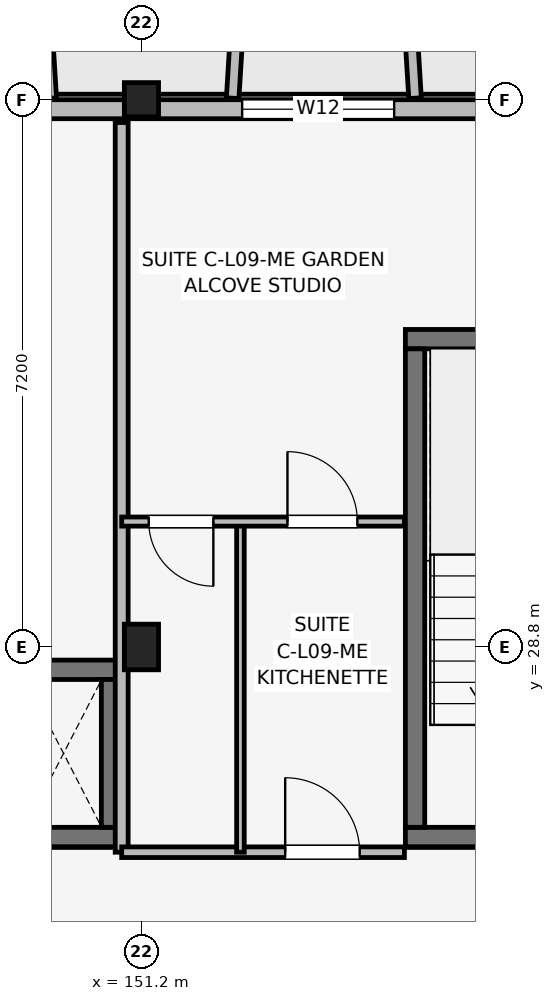
"""IFC4 building model, lengths in metres.
Left out: names, types, materials, properties, quantities, classifications, styles, units other than length and angle.
Written with IfcOpenShell. Run it as: python <this file> out.ifc"""

import sys

from ifc_helpers import new_model, si_unit, direction, frame, frame_2d, origin, origin_2d, place, context, subcontext, project, spatial, rectangle, extrude, element, fill, save


model = new_model("IFC4")
c1 = context("Model", 3, precision=1e-05, world=origin(), true_north=direction((0.0, 1.0)))
c2 = subcontext(c1, "Body", "Model", "MODEL_VIEW")
j1 = project(units=[si_unit("LENGTHUNIT", "METRE"), si_unit("PLANEANGLEUNIT", "RADIAN")], contexts=[c1])
p1 = place(None, origin())
s1 = spatial("IfcSite", under=j1, at=p1, CompositionType="ELEMENT")
p2 = place(p1, origin())
s2 = spatial("IfcBuilding", under=s1, at=p2, CompositionType="ELEMENT")
p3 = place(p2, frame((0.0, 0.0, 30.75)))
s3 = spatial("IfcBuildingStorey", under=s2, at=p3, CompositionType="ELEMENT", Elevation=30.75)
p4 = place(p3, frame((151.2, 28.8, 0.0), z_axis=(0.0, 0.0, 1.0), x_axis=(1.0, 0.0, 0.0)))
e1 = element("IfcColumn", 1, at=p4, inside=s3, PredefinedType="COLUMN", context=c2, shape_type="SweptSolid", body=[
    extrude(rectangle(XDim=0.45, YDim=0.6, at=origin_2d()), origin(), (0.0, 0.0, 1.0), 3.15),
])
p5 = place(p3, frame((151.2, 36.0, 0.0), z_axis=(0.0, 0.0, 1.0), x_axis=(1.0, 0.0, 0.0)))
e2 = element("IfcColumn", 2, at=p5, inside=s3, PredefinedType="COLUMN", context=c2, shape_type="SweptSolid", body=[
    extrude(rectangle(XDim=0.45, YDim=0.45, at=origin_2d()), origin(), (0.0, 0.0, 1.0), 3.15),
])
p6 = place(p3, frame((154.673, 26.3, 0.0), z_axis=(0.0, 0.0, 1.0), x_axis=(1.0, 0.0, 0.0)))
e3 = element("IfcWall", 3, at=p6, inside=s3, PredefinedType="SHEAR", context=c2, shape_type="SweptSolid", body=[
    extrude(rectangle(XDim=3.305, YDim=0.255, at=frame_2d((1.652, 0.0))), origin(), (0.0, 0.0, 1.0), 3.15),
])
p7 = place(p6, frame((1.127, 0.0, 0.0)))
e4 = element("IfcOpeningElement", 4, at=p7, cuts=e3, PredefinedType="OPENING", context=c2, shape_type="SweptSolid", body=[
    extrude(rectangle(XDim=1.05, YDim=2.12, at=frame_2d((0.525, 1.06))), frame((0.0, 0.137, 0.0), z_axis=(0.0, -1.0, 0.0), x_axis=(1.0, 0.0, 0.0)), (0.0, 0.0, 1.0), 0.275),
])
p8 = place(p3, frame((154.673, 32.85, 0.0), z_axis=(0.0, 0.0, 1.0), x_axis=(1.0, 0.0, 0.0)))
e5 = element("IfcWall", 5, at=p8, inside=s3, PredefinedType="SHEAR", context=c2, shape_type="SweptSolid", body=[
    extrude(rectangle(XDim=3.305, YDim=0.255, at=frame_2d((1.652, 0.0))), origin(), (0.0, 0.0, 1.0), 3.15),
])
p9 = place(p3, frame((154.8, 26.427, 0.0), z_axis=(0.0, 0.0, 1.0), x_axis=(0.0, 1.0, 0.0)))
e6 = element("IfcWall", 6, at=p9, inside=s3, PredefinedType="SHEAR", context=c2, shape_type="SweptSolid", body=[
    extrude(rectangle(XDim=6.295, YDim=0.255, at=frame_2d((3.147, 0.0))), origin(), (0.0, 0.0, 1.0), 3.15),
])
for number, where, z_axis, x_axis in (
    (7, (149.123, 26.3, 0.0), (0.0, 0.0, 1.0), (1.0, 0.0, 0.0)),
    (8, (149.123, 28.5, 0.0), (0.0, 0.0, 1.0), (1.0, 0.0, 0.0)),
):
    element("IfcWall", number, at=place(p3, frame(where, z_axis=z_axis, x_axis=x_axis)), inside=s3, PredefinedType="SHEAR", context=c2, shape_type="SweptSolid", body=[
        extrude(rectangle(XDim=1.805, YDim=0.255, at=frame_2d((0.902, 0.0))), origin(), (0.0, 0.0, 1.0), 3.15),
    ])
p10 = place(p3, frame((150.8, 26.427, 0.0), z_axis=(0.0, 0.0, 1.0), x_axis=(0.0, 1.0, 0.0)))
e9 = element("IfcWall", 9, at=p10, inside=s3, PredefinedType="SHEAR", context=c2, shape_type="SweptSolid", body=[
    extrude(rectangle(XDim=1.945, YDim=0.255, at=frame_2d((0.973, 0.0))), origin(), (0.0, 0.0, 1.0), 3.15),
])
p11 = place(p3, frame((162.6, 35.875, 0.0), z_axis=(0.0, 0.0, 1.0), x_axis=(-1.0, 0.0, 0.0)))
e10 = element("IfcWall", 10, at=p11, inside=s3, PredefinedType="SOLIDWALL", context=c2, shape_type="SweptSolid", body=[
    extrude(rectangle(XDim=30.0, YDim=0.25, at=frame_2d((15.0, 0.0))), origin(), (0.0, 0.0, 1.0), 2.48),
])
p12 = place(p11, frame((29.025, 0.0, 0.0), z_axis=(0.0, 0.0, 1.0), x_axis=(-1.0, 0.0, 0.0)))
e11 = element("IfcOpeningElement", 11, at=p12, cuts=e10, PredefinedType="OPENING", context=c2, shape_type="SweptSolid", body=[
    extrude(rectangle(XDim=1.65, YDim=2.15, at=frame_2d((0.825, 1.075))), frame((0.0, 0.135, 0.0), z_axis=(0.0, -1.0, 0.0), x_axis=(1.0, 0.0, 0.0)), (0.0, 0.0, 1.0), 0.27),
])
p13 = place(p11, frame((2.7, 0.0, 0.0), z_axis=(0.0, 0.0, 1.0), x_axis=(-1.0, 0.0, 0.0)))
e12 = element("IfcOpeningElement", 12, at=p13, cuts=e10, PredefinedType="OPENING", context=c2, shape_type="SweptSolid", body=[
    extrude(rectangle(XDim=1.8, YDim=2.15, at=frame_2d((0.9, 1.075))), frame((0.0, 0.135, 0.0), z_axis=(0.0, -1.0, 0.0), x_axis=(1.0, 0.0, 0.0)), (0.0, 0.0, 1.0), 0.27),
])
p14 = place(p11, frame((15.43, 0.0, 0.5)))
e13 = element("IfcOpeningElement", 13, at=p14, cuts=e10, PredefinedType="OPENING", context=c2, shape_type="SweptSolid", body=[
    extrude(rectangle(XDim=0.75, YDim=1.75, at=frame_2d((0.375, 0.875))), frame((0.0, 0.135, 0.0), z_axis=(0.0, -1.0, 0.0), x_axis=(1.0, 0.0, 0.0)), (0.0, 0.0, 1.0), 0.27),
])
p15 = place(p11, frame((8.075, 0.0, 0.7)))
e14 = element("IfcOpeningElement", 14, at=p15, cuts=e10, PredefinedType="OPENING", context=c2, shape_type="SweptSolid", body=[
    extrude(rectangle(XDim=2.0, YDim=1.65, at=frame_2d((1.0, 0.825))), frame((0.0, 0.135, 0.0), z_axis=(0.0, -1.0, 0.0), x_axis=(1.0, 0.0, 0.0)), (0.0, 0.0, 1.0), 0.27),
])
p16 = place(p11, frame((19.97, 0.0, 0.7)))
e15 = element("IfcOpeningElement", 15, at=p16, cuts=e10, PredefinedType="OPENING", context=c2, shape_type="SweptSolid", body=[
    extrude(rectangle(XDim=1.86, YDim=1.6, at=frame_2d((0.93, 0.8))), frame((0.0, 0.135, 0.0), z_axis=(0.0, -1.0, 0.0), x_axis=(1.0, 0.0, 0.0)), (0.0, 0.0, 1.0), 0.27),
])
p17 = place(p3, frame((150.0, 36.02, 0.0), z_axis=(0.0, 0.0, 1.0), x_axis=(-0.061170732449, 0.998127317276, 0.0)))
e16 = element("IfcWall", 16, at=p17, inside=s3, PredefinedType="ELEMENTEDWALL", context=c2, shape_type="SweptSolid", body=[
    extrude(rectangle(XDim=1.964, YDim=0.165, at=frame_2d((0.982, 0.0))), origin(), (0.0, 0.0, 1.0), 2.55),
])
for number, where, z_axis, x_axis in (
    (17, (152.4, 36.02, 0.0), (0.0, 0.0, 1.0), (0.061, 0.998, 0.0)),
    (18, (154.8, 36.02, 0.0), (0.0, 0.0, 1.0), (-0.061, 0.998, 0.0)),
):
    element("IfcWall", number, at=place(p3, frame(where, z_axis=z_axis, x_axis=x_axis)), inside=s3, PredefinedType="ELEMENTEDWALL", context=c2, shape_type="SweptSolid", body=[
        extrude(rectangle(XDim=1.964, YDim=0.165, at=frame_2d((0.982, 0.0))), origin(), (0.0, 0.0, 1.0), 2.58),
    ])
p18 = place(p3, frame((150.94, 26.1, 0.0), z_axis=(0.0, 0.0, 1.0), x_axis=(0.0, 1.0, 0.0)))
e19 = element("IfcWall", 19, at=p18, inside=s3, PredefinedType="PARTITIONING", context=c2, shape_type="SweptSolid", body=[
    extrude(rectangle(XDim=9.6, YDim=0.17, at=frame_2d((4.8, 0.0))), origin(), (0.0, 0.0, 1.0), 2.38),
])
p19 = place(p3, frame((150.94, 26.1, 0.0), z_axis=(0.0, 0.0, 1.0), x_axis=(1.0, 0.0, 0.0)))
e20 = element("IfcWall", 20, at=p19, inside=s3, PredefinedType="PARTITIONING", context=c2, shape_type="SweptSolid", body=[
    extrude(rectangle(XDim=3.72, YDim=0.14, at=frame_2d((1.86, 0.0))), origin(), (0.0, 0.0, 1.0), 2.38),
])
p20 = place(p19, frame((2.151, 0.0, 0.0)))
e21 = element("IfcOpeningElement", 21, at=p20, cuts=e20, PredefinedType="OPENING", context=c2, shape_type="SweptSolid", body=[
    extrude(rectangle(XDim=0.98, YDim=2.1, at=frame_2d((0.49, 1.05))), frame((0.0, 0.08, 0.0), z_axis=(0.0, -1.0, 0.0), x_axis=(1.0, 0.0, 0.0)), (0.0, 0.0, 1.0), 0.16),
])
p21 = place(p3, frame((152.502, 26.1, 0.0), z_axis=(0.0, 0.0, 1.0), x_axis=(0.0, 1.0, 0.0)))
e22 = element("IfcWall", 22, at=p21, inside=s3, PredefinedType="PARTITIONING", context=c2, shape_type="SweptSolid", body=[
    extrude(rectangle(XDim=4.35, YDim=0.1, at=frame_2d((2.175, 0.0))), origin(), (0.0, 0.0, 1.0), 2.38),
])
p22 = place(p3, frame((150.94, 30.45, 0.0), z_axis=(0.0, 0.0, 1.0), x_axis=(1.0, 0.0, 0.0)))
e23 = element("IfcWall", 23, at=p22, inside=s3, PredefinedType="PARTITIONING", context=c2, shape_type="SweptSolid", body=[
    extrude(rectangle(XDim=3.72, YDim=0.12, at=frame_2d((1.86, 0.0))), origin(), (0.0, 0.0, 1.0), 2.38),
])
p23 = place(p22, frame((1.206, 0.0, 0.0), z_axis=(0.0, 0.0, 1.0), x_axis=(-1.0, 0.0, 0.0)))
e24 = element("IfcOpeningElement", 24, at=p23, cuts=e23, PredefinedType="OPENING", context=c2, shape_type="SweptSolid", body=[
    extrude(rectangle(XDim=0.85, YDim=2.08, at=frame_2d((0.425, 1.04))), frame((0.0, 0.07, 0.0), z_axis=(0.0, -1.0, 0.0), x_axis=(1.0, 0.0, 0.0)), (0.0, 0.0, 1.0), 0.14),
])
p24 = place(p22, frame((2.181, 0.0, 0.0)))
e25 = element("IfcOpeningElement", 25, at=p24, cuts=e23, PredefinedType="OPENING", context=c2, shape_type="SweptSolid", body=[
    extrude(rectangle(XDim=0.92, YDim=2.08, at=frame_2d((0.46, 1.04))), frame((0.0, 0.07, 0.0), z_axis=(0.0, -1.0, 0.0), x_axis=(1.0, 0.0, 0.0)), (0.0, 0.0, 1.0), 0.14),
])
p25 = place(p15, origin())
e26 = element("IfcWindow", 26, at=p25, inside=s3, PartitioningType="SINGLE_PANEL", PredefinedType="WINDOW", context=c2, shape_type="SweptSolid", body=[
    extrude(rectangle(XDim=2.0, YDim=1.65, at=frame_2d((1.0, 0.825))), frame((0.0, 0.03, 0.0), z_axis=(0.0, -1.0, 0.0), x_axis=(1.0, 0.0, 0.0)), (0.0, 0.0, 1.0), 0.06),
])
fill(e14, e26)
p26 = place(p20, origin())
e27 = element("IfcDoor", 27, at=p26, inside=s3, OperationType="SINGLE_SWING_LEFT", PredefinedType="DOOR", context=c2, shape_type="SweptSolid", body=[
    extrude(rectangle(XDim=0.98, YDim=2.1, at=frame_2d((0.49, 1.05))), frame((0.0, 0.025, 0.0), z_axis=(0.0, -1.0, 0.0), x_axis=(1.0, 0.0, 0.0)), (0.0, 0.0, 1.0), 0.05),
])
fill(e21, e27)
p27 = place(p23, origin())
e28 = element("IfcDoor", 28, at=p27, inside=s3, OperationType="SINGLE_SWING_RIGHT", PredefinedType="DOOR", context=c2, shape_type="SweptSolid", body=[
    extrude(rectangle(XDim=0.85, YDim=2.08, at=frame_2d((0.425, 1.04))), frame((0.0, 0.025, 0.0), z_axis=(0.0, -1.0, 0.0), x_axis=(1.0, 0.0, 0.0)), (0.0, 0.0, 1.0), 0.05),
])
fill(e24, e28)
p28 = place(p24, origin())
e29 = element("IfcDoor", 29, at=p28, inside=s3, OperationType="SINGLE_SWING_LEFT", PredefinedType="DOOR", context=c2, shape_type="SweptSolid", body=[
    extrude(rectangle(XDim=0.92, YDim=2.08, at=frame_2d((0.46, 1.04))), frame((0.0, 0.025, 0.0), z_axis=(0.0, -1.0, 0.0), x_axis=(1.0, 0.0, 0.0)), (0.0, 0.0, 1.0), 0.05),
])
fill(e25, e29)
save(model, sys.argv[1])
